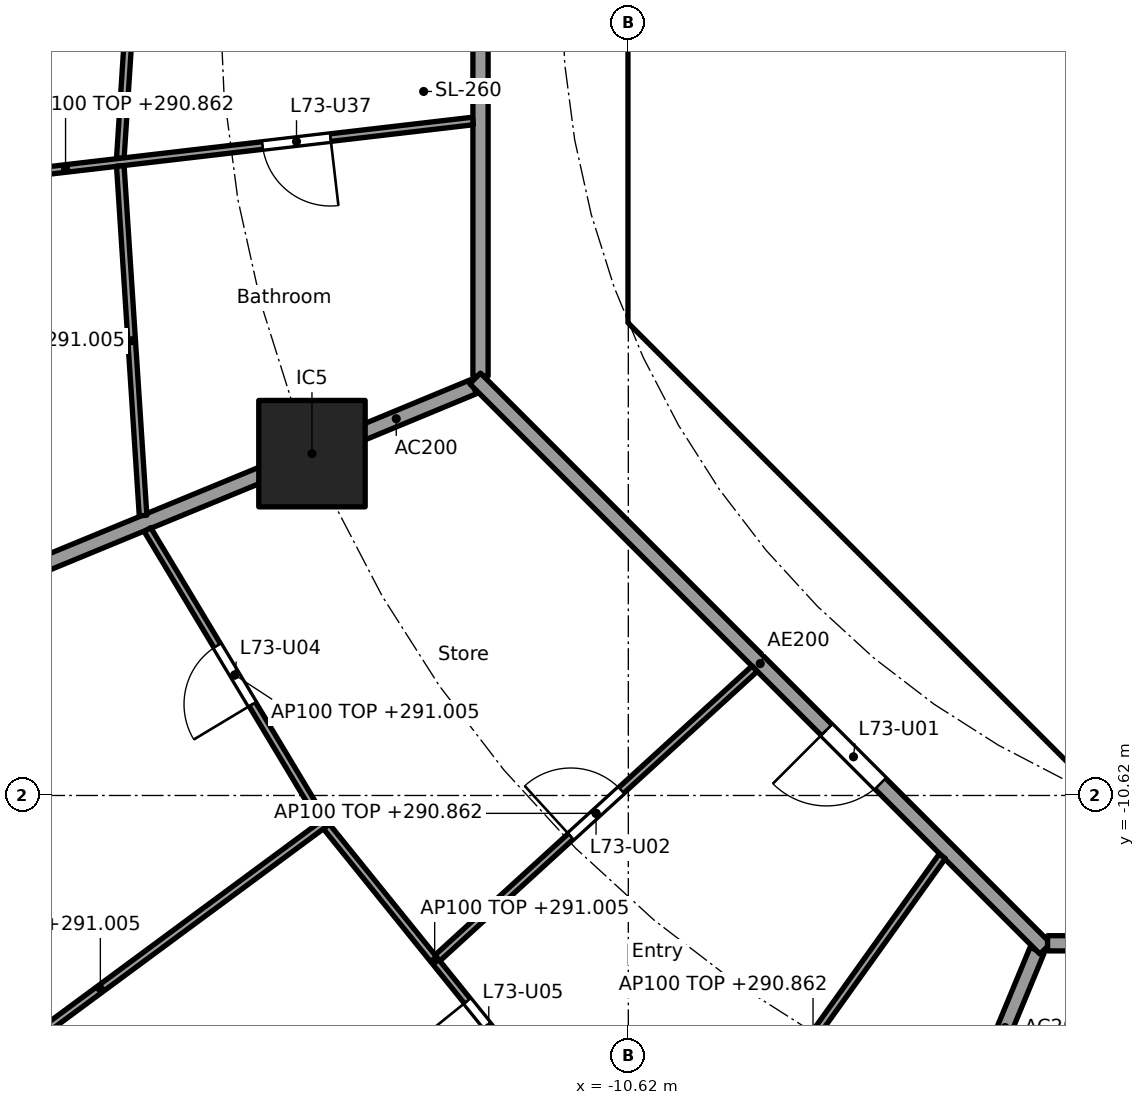
"""IFC4 building model, lengths in metres.
Left out: names, types, materials, properties, quantities, classifications, styles, units other than length and angle.
Written with IfcOpenShell. Run it as: python <this file> out.ifc"""

import sys

from ifc_helpers import new_model, si_unit, direction, frame, frame_2d, origin, origin_2d, place, context, subcontext, project, spatial, polyline, rectangle, outline, extrude, element, fill, save


model = new_model("IFC4")
c1 = context("Model", 3, precision=1e-05, world=origin(), true_north=direction((0.0, 1.0)))
c2 = subcontext(c1, "Body", "Model", "MODEL_VIEW")
j1 = project(units=[si_unit("LENGTHUNIT", "METRE"), si_unit("PLANEANGLEUNIT", "RADIAN")], contexts=[c1])
p1 = place(None, origin())
s1 = spatial("IfcSite", under=j1, at=p1, CompositionType="ELEMENT")
p2 = place(p1, origin())
s2 = spatial("IfcBuilding", under=s1, at=p2, CompositionType="ELEMENT")
p3 = place(p2, frame((0.0, 0.0, 288.1)))
s3 = spatial("IfcBuildingStorey", under=s2, at=p3, CompositionType="ELEMENT", Elevation=288.1)
p4 = place(p3, frame((-14.782, -6.123, 0.0), z_axis=(0.0, 0.0, 1.0), x_axis=(1.0, 0.0, 0.0)))
e1 = element("IfcColumn", 1, at=p4, inside=s3, PredefinedType="COLUMN", context=c2, shape_type="SweptSolid", body=[
    extrude(rectangle(XDim=1.4, YDim=1.4, at=origin_2d()), origin(), (0.0, 0.0, 1.0), 3.7),
])
p5 = place(p3, frame((-10.325, 3.801, 0.0), z_axis=(0.0, 0.0, 1.0), x_axis=(0.0, -1.0, 0.0)))
e2 = element("IfcWall", 2, at=p5, inside=s3, PredefinedType="SHEAR", context=c2, shape_type="SweptSolid", body=[
    extrude(rectangle(XDim=7.602, YDim=0.6, at=frame_2d((3.801, 0.0))), origin(), (0.0, 0.0, 1.0), 3.44),
])
p6 = place(p5, frame((0.651, 0.0, 0.0)))
e3 = element("IfcOpeningElement", 3, at=p6, cuts=e2, PredefinedType="OPENING", context=c2, shape_type="SweptSolid", body=[
    extrude(rectangle(XDim=1.5, YDim=2.1, at=frame_2d((0.75, 1.05))), frame((0.0, 0.31, 0.0), z_axis=(0.0, -1.0, 0.0), x_axis=(1.0, 0.0, 0.0)), (0.0, 0.0, 1.0), 0.62),
])
p7 = place(p5, frame((5.451, 0.0, 0.0)))
e4 = element("IfcOpeningElement", 4, at=p7, cuts=e2, PredefinedType="OPENING", context=c2, shape_type="SweptSolid", body=[
    extrude(rectangle(XDim=1.5, YDim=2.1, at=frame_2d((0.75, 1.05))), frame((0.0, 0.31, 0.0), z_axis=(0.0, -1.0, 0.0), x_axis=(1.0, 0.0, 0.0)), (0.0, 0.0, 1.0), 0.62),
])
p8 = place(p3, frame((-9.988, -4.613, 0.0), z_axis=(0.0, 0.0, 1.0), x_axis=(0.707106781187, -0.707106781187, 0.0)))
e5 = element("IfcWall", 5, at=p8, inside=s3, PredefinedType="SHEAR", context=c2, shape_type="SweptSolid", body=[
    extrude(rectangle(XDim=7.602, YDim=0.6, at=frame_2d((3.801, 0.0))), origin(), (0.0, 0.0, 1.0), 3.44),
])
p9 = place(p8, frame((6.151, 0.0, 0.0)))
e6 = element("IfcOpeningElement", 6, at=p9, cuts=e5, PredefinedType="OPENING", context=c2, shape_type="SweptSolid", body=[
    extrude(rectangle(XDim=1.1, YDim=2.1, at=frame_2d((0.55, 1.05))), frame((0.0, 0.31, 0.0), z_axis=(0.0, -1.0, 0.0), x_axis=(1.0, 0.0, 0.0)), (0.0, 0.0, 1.0), 0.62),
])
p10 = place(p3, frame((-5.8, -8.227, 0.0), z_axis=(0.0, 0.0, 1.0), x_axis=(0.0, 1.0, 0.0)))
e7 = element("IfcWall", 7, at=p10, inside=s3, PredefinedType="PARTITIONING", context=c2, shape_type="SweptSolid", body=[
    extrude(rectangle(XDim=3.927, YDim=0.15, at=frame_2d((1.963, 0.0))), origin(), (0.0, 0.0, 1.0), 3.44),
])
p11 = place(p10, frame((1.476, 0.0, 0.0)))
e8 = element("IfcOpeningElement", 8, at=p11, cuts=e7, PredefinedType="OPENING", context=c2, shape_type="SweptSolid", body=[
    extrude(rectangle(XDim=0.9, YDim=2.1, at=frame_2d((0.45, 1.05))), frame((0.0, 0.085, 0.0), z_axis=(0.0, -1.0, 0.0), x_axis=(1.0, 0.0, 0.0)), (0.0, 0.0, 1.0), 0.17),
])
p12 = place(p3, frame((-6.7, -2.0, 0.0), z_axis=(0.0, 0.0, 1.0), x_axis=(1.0, 0.0, 0.0)))
e9 = element("IfcWall", 9, at=p12, inside=s3, PredefinedType="SOLIDWALL", context=c2, shape_type="SweptSolid", body=[
    extrude(rectangle(XDim=13.4, YDim=0.2, at=frame_2d((6.7, 0.0))), origin(), (0.0, 0.0, 1.0), 3.44),
])
p13 = place(p12, frame((9.45, 0.0, 0.0)))
e10 = element("IfcOpeningElement", 10, at=p13, cuts=e9, PredefinedType="OPENING", context=c2, shape_type="SweptSolid", body=[
    extrude(rectangle(XDim=1.1, YDim=2.1, at=frame_2d((0.55, 1.05))), frame((0.0, 0.11, 0.0), z_axis=(0.0, -1.0, 0.0), x_axis=(1.0, 0.0, 0.0)), (0.0, 0.0, 1.0), 0.22),
])
p14 = place(p12, frame((11.65, 0.0, 0.0)))
e11 = element("IfcOpeningElement", 11, at=p14, cuts=e9, PredefinedType="OPENING", context=c2, shape_type="SweptSolid", body=[
    extrude(rectangle(XDim=1.1, YDim=2.1, at=frame_2d((0.55, 1.05))), frame((0.0, 0.11, 0.0), z_axis=(0.0, -1.0, 0.0), x_axis=(1.0, 0.0, 0.0)), (0.0, 0.0, 1.0), 0.22),
])
p15 = place(p12, frame((0.75, 0.0, 0.0)))
e12 = element("IfcOpeningElement", 12, at=p15, cuts=e9, PredefinedType="OPENING", context=c2, shape_type="SweptSolid", body=[
    extrude(rectangle(XDim=0.9, YDim=2.1, at=frame_2d((0.45, 1.05))), frame((0.0, 0.11, 0.0), z_axis=(0.0, -1.0, 0.0), x_axis=(1.0, 0.0, 0.0)), (0.0, 0.0, 1.0), 0.22),
])
p16 = place(p12, frame((2.95, 0.0, 0.0)))
e13 = element("IfcOpeningElement", 13, at=p16, cuts=e9, PredefinedType="OPENING", context=c2, shape_type="SweptSolid", body=[
    extrude(rectangle(XDim=0.9, YDim=2.1, at=frame_2d((0.45, 1.05))), frame((0.0, 0.11, 0.0), z_axis=(0.0, -1.0, 0.0), x_axis=(1.0, 0.0, 0.0)), (0.0, 0.0, 1.0), 0.22),
])
p17 = place(p12, frame((6.25, 0.0, 0.0)))
e14 = element("IfcOpeningElement", 14, at=p17, cuts=e9, PredefinedType="OPENING", context=c2, shape_type="SweptSolid", body=[
    extrude(rectangle(XDim=0.9, YDim=2.1, at=frame_2d((0.45, 1.05))), frame((0.0, 0.11, 0.0), z_axis=(0.0, -1.0, 0.0), x_axis=(1.0, 0.0, 0.0)), (0.0, 0.0, 1.0), 0.22),
])
p18 = place(p3, origin())
e15 = element("IfcWall", 15, at=p18, inside=s3, PredefinedType="SHEAR", context=c2, shape_type="SweptSolid", body=[
    extrude(outline(polyline([(-10.625, -3.801), (-10.025, -3.801), (-10.025, -4.152), (-9.776, -4.401), (-10.2, -4.825), (-10.625, -4.401), (-10.625, -3.801)])), origin(), (0.0, 0.0, 1.0), 3.44),
])
p19 = place(p3, origin())
e16 = element("IfcWall", 16, at=p19, inside=s3, PredefinedType="SOLIDWALL", context=c2, shape_type="SweptSolid", body=[
    extrude(outline(polyline([(-6.7, -2.1), (-6.5, -2.1), (-6.5, -4.1), (-4.5, -4.1), (-4.5, -2.1), (-4.3, -2.1), (-4.3, -4.1), (-2.3, -4.1), (-2.3, -2.1), (-2.1, -2.1), (-2.1, -4.1), (2.1, -4.1), (2.1, -2.1), (2.3, -2.1), (2.3, -4.1), (4.3, -4.1), (4.3, -2.1), (4.5, -2.1), (4.5, -4.1), (6.5, -4.1), (6.5, -2.1), (6.7, -2.1), (6.7, -4.3), (-6.7, -4.3), (-6.7, -2.1)])), origin(), (0.0, 0.0, 1.0), 3.44),
])
p20 = place(p3, frame((-10.025, -4.0, 0.0), z_axis=(0.0, 0.0, 1.0), x_axis=(1.0, 0.0, 0.0)))
e17 = element("IfcWall", 17, at=p20, inside=s3, PredefinedType="PARTITIONING", context=c2, shape_type="SweptSolid", body=[
    extrude(rectangle(XDim=3.325, YDim=0.2, at=frame_2d((1.662, 0.0))), origin(), (0.0, 0.0, 1.0), 3.44),
])
p21 = place(p3, frame((-12.657, -5.243, 0.0), z_axis=(0.0, 0.0, 1.0), x_axis=(-0.923859888513, -0.38273085373, 0.0)))
e18 = element("IfcWall", 18, at=p21, inside=s3, PredefinedType="PARTITIONING", context=c2, shape_type="SweptSolid", body=[
    extrude(rectangle(XDim=2.199, YDim=0.2, at=frame_2d((1.1, 0.0))), origin(), (0.0, 0.0, 1.0), 3.44),
])
p22 = place(p3, frame((-14.828, -6.142, 0.0), z_axis=(0.0, 0.0, 1.0), x_axis=(-0.924478087429, -0.381235184451, 0.0)))
e19 = element("IfcWall", 19, at=p22, inside=s3, PredefinedType="PARTITIONING", context=c2, shape_type="SweptSolid", body=[
    extrude(rectangle(XDim=8.499, YDim=0.2, at=frame_2d((4.25, 0.0))), origin(), (0.0, 0.0, 1.0), 2.905),
])
p23 = place(p3, frame((-5.243, -12.657, 0.0), z_axis=(0.0, 0.0, 1.0), x_axis=(-0.382770106157, -0.923843626288, 0.0)))
e20 = element("IfcWall", 20, at=p23, inside=s3, PredefinedType="PARTITIONING", context=c2, shape_type="SweptSolid", body=[
    extrude(rectangle(XDim=2.199, YDim=0.2, at=frame_2d((1.1, 0.0))), origin(), (0.0, 0.0, 1.0), 3.44),
])
p24 = place(p3, frame((-12.565, 5.304, 0.0), z_axis=(0.0, 0.0, 1.0), x_axis=(0.0, -1.0, 0.0)))
e21 = element("IfcWall", 21, at=p24, inside=s3, PredefinedType="PARTITIONING", context=c2, shape_type="SweptSolid", body=[
    extrude(rectangle(XDim=10.409, YDim=0.2, at=frame_2d((5.205, 0.0))), origin(), (0.0, 0.0, 1.0), 3.44),
])
p25 = place(p24, frame((4.804, 0.0, 0.0)))
e22 = element("IfcOpeningElement", 22, at=p25, cuts=e21, PredefinedType="OPENING", context=c2, shape_type="SweptSolid", body=[
    extrude(rectangle(XDim=1.0, YDim=2.1, at=frame_2d((0.5, 1.05))), frame((0.0, 0.11, 0.0), z_axis=(0.0, -1.0, 0.0), x_axis=(1.0, 0.0, 0.0)), (0.0, 0.0, 1.0), 0.22),
])
p26 = place(p3, frame((-12.635, -5.134, 0.0), z_axis=(0.0, 0.0, 1.0), x_axis=(0.707106781187, -0.707106781187, 0.0)))
e23 = element("IfcWall", 23, at=p26, inside=s3, PredefinedType="PARTITIONING", context=c2, shape_type="SweptSolid", body=[
    extrude(rectangle(XDim=10.609, YDim=0.2, at=frame_2d((5.305, 0.0))), origin(), (0.0, 0.0, 1.0), 3.44),
])
p27 = place(p26, frame((6.539, 0.0, 0.0)))
e24 = element("IfcOpeningElement", 24, at=p27, cuts=e23, PredefinedType="OPENING", context=c2, shape_type="SweptSolid", body=[
    extrude(rectangle(XDim=1.0, YDim=2.1, at=frame_2d((0.5, 1.05))), frame((0.0, 0.11, 0.0), z_axis=(0.0, -1.0, 0.0), x_axis=(1.0, 0.0, 0.0)), (0.0, 0.0, 1.0), 0.22),
])
p28 = place(p3, frame((-5.104, -12.565, 0.0), z_axis=(0.0, 0.0, 1.0), x_axis=(1.0, 0.0, 0.0)))
e25 = element("IfcWall", 25, at=p28, inside=s3, PredefinedType="PARTITIONING", context=c2, shape_type="SweptSolid", body=[
    extrude(rectangle(XDim=10.409, YDim=0.2, at=frame_2d((5.205, 0.0))), origin(), (0.0, 0.0, 1.0), 3.44),
])
p29 = place(p28, frame((3.303, 0.0, 0.0)))
e26 = element("IfcOpeningElement", 26, at=p29, cuts=e25, PredefinedType="OPENING", context=c2, shape_type="SweptSolid", body=[
    extrude(rectangle(XDim=1.0, YDim=2.1, at=frame_2d((0.5, 1.05))), frame((0.0, 0.11, 0.0), z_axis=(0.0, -1.0, 0.0), x_axis=(1.0, 0.0, 0.0)), (0.0, 0.0, 1.0), 0.22),
])
p30 = place(p3, frame((-17.002, 2.409, 0.0), z_axis=(0.0, 0.0, 1.0), x_axis=(-0.064855550758, -0.997894662545, 0.0)))
e27 = element("IfcWall", 27, at=p30, inside=s3, PredefinedType="PARTITIONING", context=c2, shape_type="SweptSolid", body=[
    extrude(rectangle(XDim=4.656, YDim=0.1, at=frame_2d((2.328, 0.0))), origin(), (0.0, 0.0, 1.0), 2.905),
])
p31 = place(p3, frame((-12.664, -1.746, 0.0), z_axis=(0.0, 0.0, 1.0), x_axis=(-0.993264397529, -0.115869912409, 0.0)))
e28 = element("IfcWall", 28, at=p31, inside=s3, PredefinedType="PARTITIONING", context=c2, shape_type="SweptSolid", body=[
    extrude(rectangle(XDim=10.792, YDim=0.1, at=frame_2d((5.396, 0.0))), origin(), (0.0, 0.0, 1.0), 2.762),
])
p32 = place(p31, frame((1.887, 0.0, 0.0)))
e29 = element("IfcOpeningElement", 29, at=p32, cuts=e28, PredefinedType="OPENING", context=c2, shape_type="SweptSolid", body=[
    extrude(rectangle(XDim=0.9, YDim=2.1, at=frame_2d((0.45, 1.05))), frame((0.0, 0.06, 0.0), z_axis=(0.0, -1.0, 0.0), x_axis=(1.0, 0.0, 0.0)), (0.0, 0.0, 1.0), 0.12),
])
p33 = place(p31, frame((7.283, 0.0, 0.0)))
e30 = element("IfcOpeningElement", 30, at=p33, cuts=e28, PredefinedType="OPENING", context=c2, shape_type="SweptSolid", body=[
    extrude(rectangle(XDim=0.9, YDim=2.1, at=frame_2d((0.45, 1.05))), frame((0.0, 0.06, 0.0), z_axis=(0.0, -1.0, 0.0), x_axis=(1.0, 0.0, 0.0)), (0.0, 0.0, 1.0), 0.12),
])
p34 = place(p3, frame((-17.304, -2.338, 0.0), z_axis=(0.0, 0.0, 1.0), x_axis=(0.06500001157, -0.997885263192, 0.0)))
e31 = element("IfcWall", 31, at=p34, inside=s3, PredefinedType="PARTITIONING", context=c2, shape_type="SweptSolid", body=[
    extrude(rectangle(XDim=4.609, YDim=0.1, at=frame_2d((2.304, 0.0))), origin(), (0.0, 0.0, 1.0), 2.905),
])
p35 = place(p3, frame((-16.946, -7.122, 0.0), z_axis=(0.0, 0.0, 1.0), x_axis=(0.514994556856, -0.857193447483, 0.0)))
e32 = element("IfcWall", 32, at=p35, inside=s3, PredefinedType="PARTITIONING", context=c2, shape_type="SweptSolid", body=[
    extrude(rectangle(XDim=4.462, YDim=0.1, at=frame_2d((2.231, 0.0))), origin(), (0.0, 0.0, 1.0), 2.905),
])
p36 = place(p35, frame((1.781, 0.0, 0.0)))
e33 = element("IfcOpeningElement", 33, at=p36, cuts=e32, PredefinedType="OPENING", context=c2, shape_type="SweptSolid", body=[
    extrude(rectangle(XDim=0.9, YDim=2.1, at=frame_2d((0.45, 1.05))), frame((0.0, 0.06, 0.0), z_axis=(0.0, -1.0, 0.0), x_axis=(1.0, 0.0, 0.0)), (0.0, 0.0, 1.0), 0.12),
])
p37 = place(p3, frame((-14.582, -10.96, 0.0), z_axis=(0.0, 0.0, 1.0), x_axis=(-0.804405200554, -0.594081032623, 0.0)))
e34 = element("IfcWall", 34, at=p37, inside=s3, PredefinedType="PARTITIONING", context=c2, shape_type="SweptSolid", body=[
    extrude(rectangle(XDim=7.418, YDim=0.1, at=frame_2d((3.709, 0.0))), origin(), (0.0, 0.0, 1.0), 2.905),
])
p38 = place(p3, frame((-14.591, -11.029, 0.0), z_axis=(0.0, 0.0, 1.0), x_axis=(0.628170338674, -0.778075848237, 0.0)))
e35 = element("IfcWall", 35, at=p38, inside=s3, PredefinedType="PARTITIONING", context=c2, shape_type="SweptSolid", body=[
    extrude(rectangle(XDim=4.532, YDim=0.1, at=frame_2d((2.266, 0.0))), origin(), (0.0, 0.0, 1.0), 2.905),
])
p39 = place(p38, frame((2.949, 0.0, 0.0)))
e36 = element("IfcOpeningElement", 36, at=p39, cuts=e35, PredefinedType="OPENING", context=c2, shape_type="SweptSolid", body=[
    extrude(rectangle(XDim=0.9, YDim=2.1, at=frame_2d((0.45, 1.05))), frame((0.0, 0.06, 0.0), z_axis=(0.0, -1.0, 0.0), x_axis=(1.0, 0.0, 0.0)), (0.0, 0.0, 1.0), 0.12),
])
p40 = place(p3, frame((-8.958, -8.952, 0.0), z_axis=(0.0, 0.0, 1.0), x_axis=(-0.73876526954, -0.673962815385, 0.0)))
e37 = element("IfcWall", 37, at=p40, inside=s3, PredefinedType="PARTITIONING", context=c2, shape_type="SweptSolid", body=[
    extrude(rectangle(XDim=5.647, YDim=0.1, at=frame_2d((2.824, 0.0))), origin(), (0.0, 0.0, 1.0), 2.762),
])
p41 = place(p40, frame((2.374, 0.0, 0.0)))
e38 = element("IfcOpeningElement", 38, at=p41, cuts=e37, PredefinedType="OPENING", context=c2, shape_type="SweptSolid", body=[
    extrude(rectangle(XDim=0.9, YDim=2.1, at=frame_2d((0.45, 1.05))), frame((0.0, 0.06, 0.0), z_axis=(0.0, -1.0, 0.0), x_axis=(1.0, 0.0, 0.0)), (0.0, 0.0, 1.0), 0.12),
])
p42 = place(p3, frame((-6.49, -11.419, 0.0), z_axis=(0.0, 0.0, 1.0), x_axis=(-0.58201647594, -0.813176992871, 0.0)))
e39 = element("IfcWall", 39, at=p42, inside=s3, PredefinedType="PARTITIONING", context=c2, shape_type="SweptSolid", body=[
    extrude(rectangle(XDim=5.844, YDim=0.1, at=frame_2d((2.922, 0.0))), origin(), (0.0, 0.0, 1.0), 2.762),
])
p43 = place(p42, frame((4.169, 0.0, 0.0)))
e40 = element("IfcOpeningElement", 40, at=p43, cuts=e39, PredefinedType="OPENING", context=c2, shape_type="SweptSolid", body=[
    extrude(rectangle(XDim=0.9, YDim=2.1, at=frame_2d((0.45, 1.05))), frame((0.0, 0.06, 0.0), z_axis=(0.0, -1.0, 0.0), x_axis=(1.0, 0.0, 0.0)), (0.0, 0.0, 1.0), 0.12),
])
p44 = place(p3, frame((-2.633, -12.66, 0.0), z_axis=(0.0, 0.0, 1.0), x_axis=(-0.311432955908, -0.950268127412, 0.0)))
e41 = element("IfcWall", 41, at=p44, inside=s3, PredefinedType="PARTITIONING", context=c2, shape_type="SweptSolid", body=[
    extrude(rectangle(XDim=15.074, YDim=0.1, at=frame_2d((7.537, 0.0))), origin(), (0.0, 0.0, 1.0), 2.762),
])
p45 = place(p44, frame((0.829, 0.0, 0.0)))
e42 = element("IfcOpeningElement", 42, at=p45, cuts=e41, PredefinedType="OPENING", context=c2, shape_type="SweptSolid", body=[
    extrude(rectangle(XDim=0.9, YDim=2.1, at=frame_2d((0.45, 1.05))), frame((0.0, 0.06, 0.0), z_axis=(0.0, -1.0, 0.0), x_axis=(1.0, 0.0, 0.0)), (0.0, 0.0, 1.0), 0.12),
])
p46 = place(p11, origin())
e43 = element("IfcDoor", 43, at=p46, inside=s3, OperationType="SINGLE_SWING_RIGHT", PredefinedType="DOOR", context=c2, shape_type="SweptSolid", body=[
    extrude(rectangle(XDim=0.9, YDim=2.1, at=frame_2d((0.45, 1.05))), frame((0.0, 0.025, 0.0), z_axis=(0.0, -1.0, 0.0), x_axis=(1.0, 0.0, 0.0)), (0.0, 0.0, 1.0), 0.05),
])
fill(e8, e43)
p47 = place(p15, frame((0.9, 0.0, 0.0), x_axis=(-1.0, 0.0, 0.0)))
e44 = element("IfcDoor", 44, at=p47, inside=s3, OperationType="SINGLE_SWING_RIGHT", PredefinedType="DOOR", context=c2, shape_type="SweptSolid", body=[
    extrude(rectangle(XDim=0.9, YDim=2.1, at=frame_2d((0.45, 1.05))), frame((0.0, 0.025, 0.0), z_axis=(0.0, -1.0, 0.0), x_axis=(1.0, 0.0, 0.0)), (0.0, 0.0, 1.0), 0.05),
])
fill(e12, e44)
p48 = place(p7, origin())
e45 = element("IfcDoor", 45, at=p48, inside=s3, OperationType="DOUBLE_DOOR_SINGLE_SWING", PredefinedType="DOOR", context=c2, shape_type="SweptSolid", body=[
    extrude(rectangle(XDim=1.5, YDim=2.1, at=frame_2d((0.75, 1.05))), frame((0.0, 0.025, 0.0), z_axis=(0.0, -1.0, 0.0), x_axis=(1.0, 0.0, 0.0)), (0.0, 0.0, 1.0), 0.05),
])
fill(e4, e45)
p49 = place(p9, origin())
e46 = element("IfcDoor", 46, at=p49, inside=s3, OperationType="SINGLE_SWING_LEFT", PredefinedType="DOOR", context=c2, shape_type="SweptSolid", body=[
    extrude(rectangle(XDim=1.1, YDim=2.1, at=frame_2d((0.55, 1.05))), frame((0.0, 0.025, 0.0), z_axis=(0.0, -1.0, 0.0), x_axis=(1.0, 0.0, 0.0)), (0.0, 0.0, 1.0), 0.05),
])
fill(e6, e46)
p50 = place(p27, frame((1.0, 0.0, 0.0), x_axis=(-1.0, 0.0, 0.0)))
e47 = element("IfcDoor", 47, at=p50, inside=s3, OperationType="SINGLE_SWING_RIGHT", PredefinedType="DOOR", context=c2, shape_type="SweptSolid", body=[
    extrude(rectangle(XDim=1.0, YDim=2.1, at=frame_2d((0.5, 1.05))), frame((0.0, 0.025, 0.0), z_axis=(0.0, -1.0, 0.0), x_axis=(1.0, 0.0, 0.0)), (0.0, 0.0, 1.0), 0.05),
])
fill(e24, e47)
p51 = place(p41, frame((0.9, 0.0, 0.0), x_axis=(-1.0, 0.0, 0.0)))
e48 = element("IfcDoor", 48, at=p51, inside=s3, OperationType="SINGLE_SWING_LEFT", PredefinedType="DOOR", context=c2, shape_type="SweptSolid", body=[
    extrude(rectangle(XDim=0.9, YDim=2.1, at=frame_2d((0.45, 1.05))), frame((0.0, 0.025, 0.0), z_axis=(0.0, -1.0, 0.0), x_axis=(1.0, 0.0, 0.0)), (0.0, 0.0, 1.0), 0.05),
])
fill(e38, e48)
p52 = place(p36, frame((0.9, 0.0, 0.0), x_axis=(-1.0, 0.0, 0.0)))
e49 = element("IfcDoor", 49, at=p52, inside=s3, OperationType="SINGLE_SWING_LEFT", PredefinedType="DOOR", context=c2, shape_type="SweptSolid", body=[
    extrude(rectangle(XDim=0.9, YDim=2.1, at=frame_2d((0.45, 1.05))), frame((0.0, 0.025, 0.0), z_axis=(0.0, -1.0, 0.0), x_axis=(1.0, 0.0, 0.0)), (0.0, 0.0, 1.0), 0.05),
])
fill(e33, e49)
p53 = place(p39, frame((0.9, 0.0, 0.0), x_axis=(-1.0, 0.0, 0.0)))
e50 = element("IfcDoor", 50, at=p53, inside=s3, OperationType="SINGLE_SWING_RIGHT", PredefinedType="DOOR", context=c2, shape_type="SweptSolid", body=[
    extrude(rectangle(XDim=0.9, YDim=2.1, at=frame_2d((0.45, 1.05))), frame((0.0, 0.025, 0.0), z_axis=(0.0, -1.0, 0.0), x_axis=(1.0, 0.0, 0.0)), (0.0, 0.0, 1.0), 0.05),
])
fill(e36, e50)
p54 = place(p32, origin())
e51 = element("IfcDoor", 51, at=p54, inside=s3, OperationType="SINGLE_SWING_LEFT", PredefinedType="DOOR", context=c2, shape_type="SweptSolid", body=[
    extrude(rectangle(XDim=0.9, YDim=2.1, at=frame_2d((0.45, 1.05))), frame((0.0, 0.025, 0.0), z_axis=(0.0, -1.0, 0.0), x_axis=(1.0, 0.0, 0.0)), (0.0, 0.0, 1.0), 0.05),
])
fill(e29, e51)
save(model, sys.argv[1])
